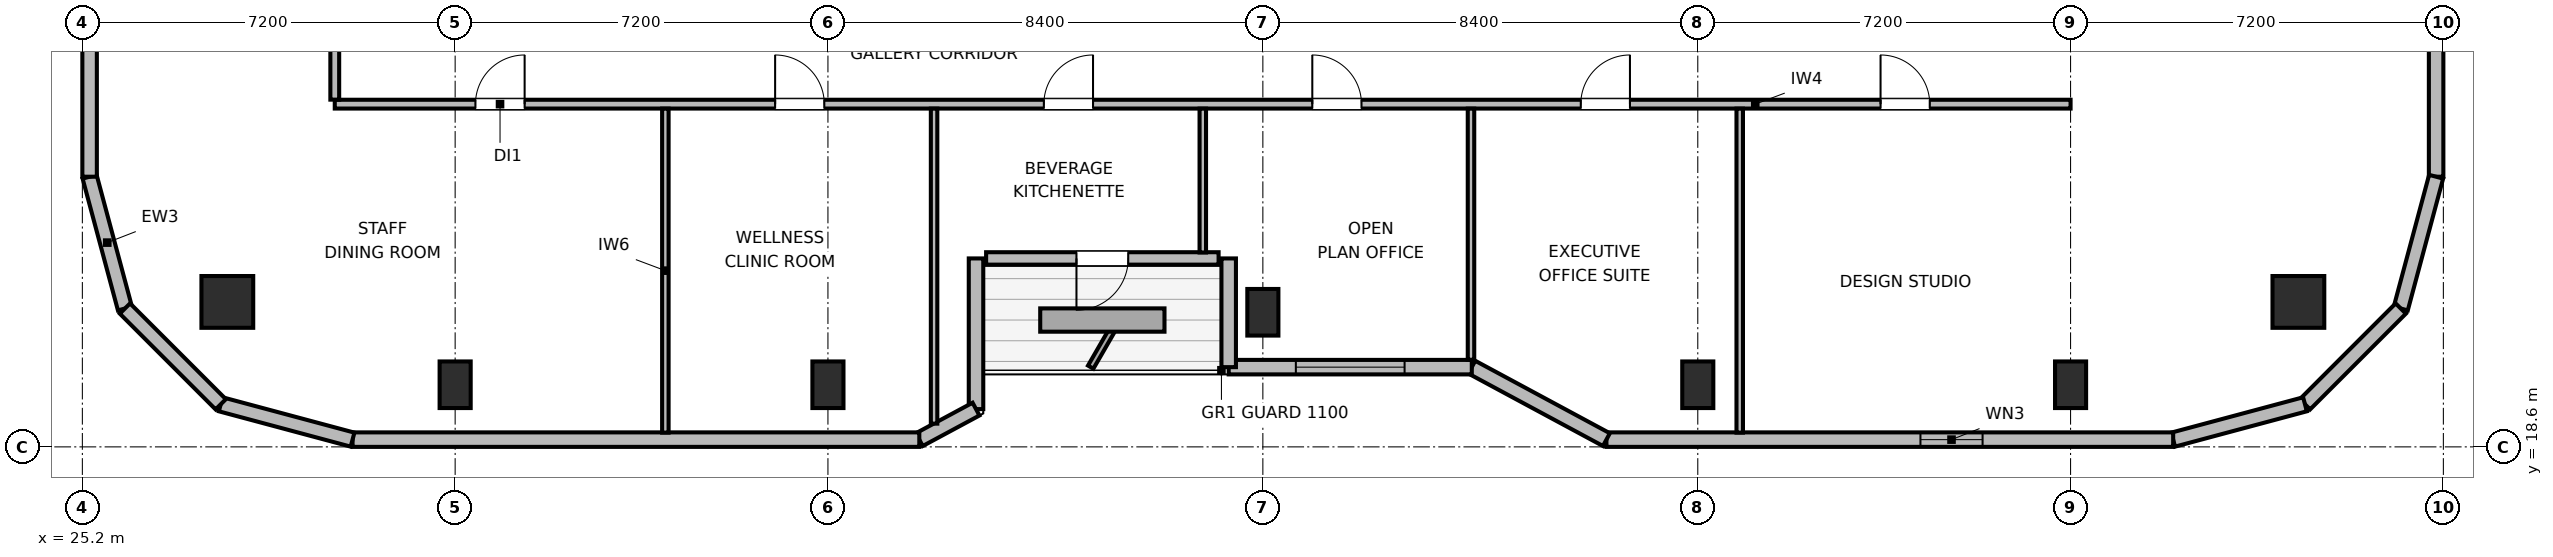
"""IFC4 building model, lengths in metres.
Left out: names, types, materials, properties, quantities, classifications, styles, units other than length and angle.
Written with IfcOpenShell. Run it as: python <this file> out.ifc"""

import sys

from ifc_helpers import new_model, si_unit, direction, frame, frame_2d, origin, origin_2d, place, context, subcontext, project, spatial, rectangle, circle, extrude, element, fill, save


model = new_model("IFC4")
c1 = context("Model", 3, precision=1e-05, world=origin(), true_north=direction((0.0, 1.0)))
c2 = subcontext(c1, "Body", "Model", "MODEL_VIEW")
j1 = project(units=[si_unit("LENGTHUNIT", "METRE"), si_unit("PLANEANGLEUNIT", "RADIAN")], contexts=[c1])
p1 = place(None, origin())
s1 = spatial("IfcSite", under=j1, at=p1, CompositionType="ELEMENT")
p2 = place(p1, origin())
s2 = spatial("IfcBuilding", under=s1, at=p2, CompositionType="ELEMENT")
p3 = place(p2, frame((0.0, 0.0, 251.1)))
s3 = spatial("IfcBuildingStorey", under=s2, at=p3, CompositionType="ELEMENT", Elevation=251.1)
for number, where, z_axis, x_axis in (
    (1, (28.0, 21.4, 0.0), (0.0, 0.0, 1.0), (1.0, 0.0, 0.0)),
    (2, (68.0, 21.4, 0.0), (0.0, 0.0, 1.0), (1.0, 0.0, 0.0)),
):
    element("IfcColumn", number, at=place(p3, frame(where, z_axis=z_axis, x_axis=x_axis)), inside=s3, PredefinedType="COLUMN", context=c2, shape_type="SweptSolid", body=[
        extrude(circle(Radius=0.5, at=origin_2d()), origin(), (0.0, 0.0, 1.0), 3.9),
    ])
for number, where, z_axis, x_axis in (
    (3, (32.4, 19.8, 0.0), (0.0, 0.0, 1.0), (1.0, 0.0, 0.0)),
    (4, (39.6, 19.8, 0.0), (0.0, 0.0, 1.0), (1.0, 0.0, 0.0)),
    (5, (48.0, 21.2, 0.0), (0.0, 0.0, 1.0), (1.0, 0.0, 0.0)),
    (6, (56.4, 19.8, 0.0), (0.0, 0.0, 1.0), (1.0, 0.0, 0.0)),
    (7, (63.6, 19.8, 0.0), (0.0, 0.0, 1.0), (1.0, 0.0, 0.0)),
):
    element("IfcColumn", number, at=place(p3, frame(where, z_axis=z_axis, x_axis=x_axis)), inside=s3, PredefinedType="COLUMN", context=c2, shape_type="SweptSolid", body=[
        extrude(rectangle(XDim=0.6, YDim=0.9, at=origin_2d()), origin(), (0.0, 0.0, 1.0), 3.9),
    ])
p4 = place(p3, frame((26.022, 21.272, 0.0), z_axis=(0.0, 0.0, 1.0), x_axis=(-0.2588904131, 0.965906700466, 0.0)))
e8 = element("IfcWall", 8, at=p4, inside=s3, PredefinedType="SOLIDWALL", context=c2, shape_type="SweptSolid", body=[
    extrude(rectangle(XDim=2.636, YDim=0.28, at=frame_2d((1.318, 0.0))), origin(), (0.0, 0.0, 1.0), 3.68),
])
p5 = place(p3, frame((25.34, 23.818, 0.0), z_axis=(0.0, 0.0, 1.0), x_axis=(0.0, 1.0, 0.0)))
e9 = element("IfcWall", 9, at=p5, inside=s3, PredefinedType="SOLIDWALL", context=c2, shape_type="SweptSolid", body=[
    extrude(rectangle(XDim=5.442, YDim=0.28, at=frame_2d((2.721, 0.0))), origin(), (0.0, 0.0, 1.0), 3.68),
])
p6 = place(p3, frame((70.66, 37.66, 0.0), z_axis=(0.0, 0.0, 1.0), x_axis=(0.0, -1.0, 0.0)))
e10 = element("IfcWall", 10, at=p6, inside=s3, PredefinedType="SOLIDWALL", context=c2, shape_type="SweptSolid", body=[
    extrude(rectangle(XDim=13.842, YDim=0.28, at=frame_2d((6.921, 0.0))), origin(), (0.0, 0.0, 1.0), 3.68),
])
p7 = place(p6, frame((5.871, 0.0, 0.85)))
e11 = element("IfcOpeningElement", 11, at=p7, cuts=e10, PredefinedType="OPENING", context=c2, shape_type="SweptSolid", body=[
    extrude(rectangle(XDim=2.1, YDim=1.05, at=frame_2d((1.05, 0.525))), frame((0.0, 0.15, 0.0), z_axis=(0.0, -1.0, 0.0), x_axis=(1.0, 0.0, 0.0)), (0.0, 0.0, 1.0), 0.3),
])
p8 = place(p3, frame((70.66, 23.818, 0.0), z_axis=(0.0, 0.0, 1.0), x_axis=(-0.2588904131, -0.965906700466, 0.0)))
e12 = element("IfcWall", 12, at=p8, inside=s3, PredefinedType="SOLIDWALL", context=c2, shape_type="SweptSolid", body=[
    extrude(rectangle(XDim=2.636, YDim=0.28, at=frame_2d((1.318, 0.0))), origin(), (0.0, 0.0, 1.0), 3.68),
])
p9 = place(p3, frame((69.978, 21.272, 0.0), z_axis=(0.0, 0.0, 1.0), x_axis=(-0.707153437963, -0.707060121331, 0.0)))
e13 = element("IfcWall", 13, at=p9, inside=s3, PredefinedType="SOLIDWALL", context=c2, shape_type="SweptSolid", body=[
    extrude(rectangle(XDim=2.616, YDim=0.28, at=frame_2d((1.308, 0.0))), origin(), (0.0, 0.0, 1.0), 3.68),
])
p10 = place(p3, frame((68.127, 19.423, 0.0), z_axis=(0.0, 0.0, 1.0), x_axis=(-0.965883534663, -0.258976828051, 0.0)))
e14 = element("IfcWall", 14, at=p10, inside=s3, PredefinedType="SOLIDWALL", context=c2, shape_type="SweptSolid", body=[
    extrude(rectangle(XDim=2.636, YDim=0.28, at=frame_2d((1.318, 0.0))), origin(), (0.0, 0.0, 1.0), 3.68),
])
p11 = place(p3, frame((65.582, 18.74, 0.0), z_axis=(0.0, 0.0, 1.0), x_axis=(-1.0, 0.0, 0.0)))
e15 = element("IfcWall", 15, at=p11, inside=s3, PredefinedType="SOLIDWALL", context=c2, shape_type="SweptSolid", body=[
    extrude(rectangle(XDim=10.946, YDim=0.28, at=frame_2d((5.473, 0.0))), origin(), (0.0, 0.0, 1.0), 3.68),
])
p12 = place(p11, frame((3.681, 0.0, 0.85)))
e16 = element("IfcOpeningElement", 16, at=p12, cuts=e15, PredefinedType="OPENING", context=c2, shape_type="SweptSolid", body=[
    extrude(rectangle(XDim=1.2, YDim=1.1, at=frame_2d((0.6, 0.55))), frame((0.0, 0.15, 0.0), z_axis=(0.0, -1.0, 0.0), x_axis=(1.0, 0.0, 0.0)), (0.0, 0.0, 1.0), 0.3),
])
p13 = place(p3, frame((54.635, 18.74, 0.0), z_axis=(0.0, 0.0, 1.0), x_axis=(-0.880473754814, 0.474094892488, 0.0)))
e17 = element("IfcWall", 17, at=p13, inside=s3, PredefinedType="SOLIDWALL", context=c2, shape_type="SweptSolid", body=[
    extrude(rectangle(XDim=2.953, YDim=0.28, at=frame_2d((1.477, 0.0))), origin(), (0.0, 0.0, 1.0), 2.215),
])
p14 = place(p3, frame((52.035, 20.14, 0.0), z_axis=(0.0, 0.0, 1.0), x_axis=(-1.0, 0.0, 0.0)))
e18 = element("IfcWall", 18, at=p14, inside=s3, PredefinedType="SOLIDWALL", context=c2, shape_type="SweptSolid", body=[
    extrude(rectangle(XDim=4.695, YDim=0.28, at=frame_2d((2.348, 0.0))), origin(), (0.0, 0.0, 1.0), 2.215),
])
p15 = place(p14, frame((1.298, 0.0, 0.85)))
e19 = element("IfcOpeningElement", 19, at=p15, cuts=e18, PredefinedType="OPENING", context=c2, shape_type="SweptSolid", body=[
    extrude(rectangle(XDim=2.1, YDim=1.05, at=frame_2d((1.05, 0.525))), frame((0.0, 0.15, 0.0), z_axis=(0.0, -1.0, 0.0), x_axis=(1.0, 0.0, 0.0)), (0.0, 0.0, 1.0), 0.3),
])
p16 = place(p3, frame((47.34, 20.14, 0.0), z_axis=(0.0, 0.0, 1.0), x_axis=(0.0, 1.0, 0.0)))
e20 = element("IfcWall", 20, at=p16, inside=s3, PredefinedType="SOLIDWALL", context=c2, shape_type="SweptSolid", body=[
    extrude(rectangle(XDim=2.1, YDim=0.28, at=frame_2d((1.05, 0.0))), origin(), (0.0, 0.0, 1.0), 2.215),
])
p17 = place(p3, frame((47.145, 22.24, 0.0), z_axis=(0.0, 0.0, 1.0), x_axis=(-1.0, 0.0, 0.0)))
e21 = element("IfcWall", 21, at=p17, inside=s3, PredefinedType="SOLIDWALL", context=c2, shape_type="SweptSolid", body=[
    extrude(rectangle(XDim=4.49, YDim=0.24, at=frame_2d((2.245, 0.0))), origin(), (0.0, 0.0, 1.0), 2.215),
])
p18 = place(p17, frame((1.745, 0.0, 0.0)))
e22 = element("IfcOpeningElement", 22, at=p18, cuts=e21, PredefinedType="OPENING", context=c2, shape_type="SweptSolid", body=[
    extrude(rectangle(XDim=1.0, YDim=2.02, at=frame_2d((0.5, 1.01))), frame((0.0, 0.13, 0.0), z_axis=(0.0, -1.0, 0.0), x_axis=(1.0, 0.0, 0.0)), (0.0, 0.0, 1.0), 0.26),
])
p19 = place(p3, frame((42.46, 22.24, 0.0), z_axis=(0.0, 0.0, 1.0), x_axis=(0.0, -1.0, 0.0)))
e23 = element("IfcWall", 23, at=p19, inside=s3, PredefinedType="SOLIDWALL", context=c2, shape_type="SweptSolid", body=[
    extrude(rectangle(XDim=2.91, YDim=0.28, at=frame_2d((1.455, 0.0))), origin(), (0.0, 0.0, 1.0), 2.215),
])
p20 = place(p3, frame((42.46, 19.33, 0.0), z_axis=(0.0, 0.0, 1.0), x_axis=(-0.880515214249, -0.474017887296, 0.0)))
e24 = element("IfcWall", 24, at=p20, inside=s3, PredefinedType="SOLIDWALL", context=c2, shape_type="SweptSolid", body=[
    extrude(rectangle(XDim=1.244, YDim=0.28, at=frame_2d((0.622, 0.0))), origin(), (0.0, 0.0, 1.0), 3.68),
])
p21 = place(p3, frame((41.365, 18.74, 0.0), z_axis=(0.0, 0.0, 1.0), x_axis=(-1.0, 0.0, 0.0)))
e25 = element("IfcWall", 25, at=p21, inside=s3, PredefinedType="SOLIDWALL", context=c2, shape_type="SweptSolid", body=[
    extrude(rectangle(XDim=10.946, YDim=0.28, at=frame_2d((5.473, 0.0))), origin(), (0.0, 0.0, 1.0), 3.68),
])
p22 = place(p3, frame((30.418, 18.74, 0.0), z_axis=(0.0, 0.0, 1.0), x_axis=(-0.965883534663, 0.258976828051, 0.0)))
e26 = element("IfcWall", 26, at=p22, inside=s3, PredefinedType="SOLIDWALL", context=c2, shape_type="SweptSolid", body=[
    extrude(rectangle(XDim=2.636, YDim=0.28, at=frame_2d((1.318, 0.0))), origin(), (0.0, 0.0, 1.0), 3.68),
])
p23 = place(p3, frame((27.873, 19.423, 0.0), z_axis=(0.0, 0.0, 1.0), x_axis=(-0.707153437963, 0.707060121331, 0.0)))
e27 = element("IfcWall", 27, at=p23, inside=s3, PredefinedType="SOLIDWALL", context=c2, shape_type="SweptSolid", body=[
    extrude(rectangle(XDim=2.616, YDim=0.28, at=frame_2d((1.308, 0.0))), origin(), (0.0, 0.0, 1.0), 3.68),
])
p24 = place(p3, frame((30.075, 25.22, 0.0), z_axis=(0.0, 0.0, 1.0), x_axis=(1.0, 0.0, 0.0)))
e28 = element("IfcWall", 28, at=p24, inside=s3, PredefinedType="PARTITIONING", context=c2, shape_type="SweptSolid", body=[
    extrude(rectangle(XDim=33.525, YDim=0.17, at=frame_2d((16.763, 0.0))), origin(), (0.0, 0.0, 1.0), 3.68),
])
p25 = place(p24, frame((2.717, 0.0, 0.0)))
e29 = element("IfcOpeningElement", 29, at=p25, cuts=e28, PredefinedType="OPENING", context=c2, shape_type="SweptSolid", body=[
    extrude(rectangle(XDim=0.95, YDim=2.04, at=frame_2d((0.475, 1.02))), frame((0.0, 0.095, 0.0), z_axis=(0.0, -1.0, 0.0), x_axis=(1.0, 0.0, 0.0)), (0.0, 0.0, 1.0), 0.19),
])
p26 = place(p24, frame((8.505, 0.0, 0.0)))
e30 = element("IfcOpeningElement", 30, at=p26, cuts=e28, PredefinedType="OPENING", context=c2, shape_type="SweptSolid", body=[
    extrude(rectangle(XDim=0.95, YDim=2.04, at=frame_2d((0.475, 1.02))), frame((0.0, 0.095, 0.0), z_axis=(0.0, -1.0, 0.0), x_axis=(1.0, 0.0, 0.0)), (0.0, 0.0, 1.0), 0.19),
])
p27 = place(p24, frame((13.695, 0.0, 0.0)))
e31 = element("IfcOpeningElement", 31, at=p27, cuts=e28, PredefinedType="OPENING", context=c2, shape_type="SweptSolid", body=[
    extrude(rectangle(XDim=0.95, YDim=2.04, at=frame_2d((0.475, 1.02))), frame((0.0, 0.095, 0.0), z_axis=(0.0, -1.0, 0.0), x_axis=(1.0, 0.0, 0.0)), (0.0, 0.0, 1.0), 0.19),
])
p28 = place(p24, frame((18.88, 0.0, 0.0)))
e32 = element("IfcOpeningElement", 32, at=p28, cuts=e28, PredefinedType="OPENING", context=c2, shape_type="SweptSolid", body=[
    extrude(rectangle(XDim=0.95, YDim=2.04, at=frame_2d((0.475, 1.02))), frame((0.0, 0.095, 0.0), z_axis=(0.0, -1.0, 0.0), x_axis=(1.0, 0.0, 0.0)), (0.0, 0.0, 1.0), 0.19),
])
p29 = place(p24, frame((24.065, 0.0, 0.0)))
e33 = element("IfcOpeningElement", 33, at=p29, cuts=e28, PredefinedType="OPENING", context=c2, shape_type="SweptSolid", body=[
    extrude(rectangle(XDim=0.95, YDim=2.04, at=frame_2d((0.475, 1.02))), frame((0.0, 0.095, 0.0), z_axis=(0.0, -1.0, 0.0), x_axis=(1.0, 0.0, 0.0)), (0.0, 0.0, 1.0), 0.19),
])
p30 = place(p24, frame((29.855, 0.0, 0.0)))
e34 = element("IfcOpeningElement", 34, at=p30, cuts=e28, PredefinedType="OPENING", context=c2, shape_type="SweptSolid", body=[
    extrude(rectangle(XDim=0.95, YDim=2.04, at=frame_2d((0.475, 1.02))), frame((0.0, 0.095, 0.0), z_axis=(0.0, -1.0, 0.0), x_axis=(1.0, 0.0, 0.0)), (0.0, 0.0, 1.0), 0.19),
])
p31 = place(p3, frame((30.075, 25.307, 0.0), z_axis=(0.0, 0.0, 1.0), x_axis=(0.0, 1.0, 0.0)))
e35 = element("IfcWall", 35, at=p31, inside=s3, PredefinedType="PARTITIONING", context=c2, shape_type="SweptSolid", body=[
    extrude(rectangle(XDim=21.386, YDim=0.17, at=frame_2d((10.693, 0.0))), origin(), (0.0, 0.0, 1.0), 3.68),
])
p32 = place(p31, frame((4.428, 0.0, 0.0)))
e36 = element("IfcOpeningElement", 36, at=p32, cuts=e35, PredefinedType="OPENING", context=c2, shape_type="SweptSolid", body=[
    extrude(rectangle(XDim=0.95, YDim=2.04, at=frame_2d((0.475, 1.02))), frame((0.0, 0.095, 0.0), z_axis=(0.0, -1.0, 0.0), x_axis=(1.0, 0.0, 0.0)), (0.0, 0.0, 1.0), 0.19),
])
p33 = place(p31, frame((15.208, 0.0, 0.0)))
e37 = element("IfcOpeningElement", 37, at=p33, cuts=e35, PredefinedType="OPENING", context=c2, shape_type="SweptSolid", body=[
    extrude(rectangle(XDim=0.95, YDim=2.04, at=frame_2d((0.475, 1.02))), frame((0.0, 0.095, 0.0), z_axis=(0.0, -1.0, 0.0), x_axis=(1.0, 0.0, 0.0)), (0.0, 0.0, 1.0), 0.19),
])
p34 = place(p3, frame((36.46, 18.875, 0.0), z_axis=(0.0, 0.0, 1.0), x_axis=(0.0, 1.0, 0.0)))
e38 = element("IfcWall", 38, at=p34, inside=s3, PredefinedType="PARTITIONING", context=c2, shape_type="SweptSolid", body=[
    extrude(rectangle(XDim=6.258, YDim=0.125, at=frame_2d((3.129, 0.0))), origin(), (0.0, 0.0, 1.0), 3.68),
])
p35 = place(p3, frame((41.65, 19.049, 0.0), z_axis=(0.0, 0.0, 1.0), x_axis=(0.0, 1.0, 0.0)))
e39 = element("IfcWall", 39, at=p35, inside=s3, PredefinedType="PARTITIONING", context=c2, shape_type="SweptSolid", body=[
    extrude(rectangle(XDim=6.084, YDim=0.125, at=frame_2d((3.042, 0.0))), origin(), (0.0, 0.0, 1.0), 3.043),
])
p36 = place(p3, frame((46.84, 22.355, 0.0), z_axis=(0.0, 0.0, 1.0), x_axis=(0.0, 1.0, 0.0)))
e40 = element("IfcWall", 40, at=p36, inside=s3, PredefinedType="PARTITIONING", context=c2, shape_type="SweptSolid", body=[
    extrude(rectangle(XDim=2.778, YDim=0.125, at=frame_2d((1.389, 0.0))), origin(), (0.0, 0.0, 1.0), 3.68),
])
p37 = place(p3, frame((52.02, 20.283, 0.0), z_axis=(0.0, 0.0, 1.0), x_axis=(0.0, 1.0, 0.0)))
e41 = element("IfcWall", 41, at=p37, inside=s3, PredefinedType="PARTITIONING", context=c2, shape_type="SweptSolid", body=[
    extrude(rectangle(XDim=4.85, YDim=0.125, at=frame_2d((2.425, 0.0))), origin(), (0.0, 0.0, 1.0), 3.68),
])
p38 = place(p3, frame((57.21, 18.875, 0.0), z_axis=(0.0, 0.0, 1.0), x_axis=(0.0, 1.0, 0.0)))
e42 = element("IfcWall", 42, at=p38, inside=s3, PredefinedType="PARTITIONING", context=c2, shape_type="SweptSolid", body=[
    extrude(rectangle(XDim=6.258, YDim=0.125, at=frame_2d((3.129, 0.0))), origin(), (0.0, 0.0, 1.0), 3.68),
])
p39 = place(p12, origin())
e43 = element("IfcWindow", 43, at=p39, inside=s3, PartitioningType="SINGLE_PANEL", PredefinedType="WINDOW", context=c2, shape_type="SweptSolid", body=[
    extrude(rectangle(XDim=1.2, YDim=1.1, at=frame_2d((0.6, 0.55))), frame((0.0, 0.03, 0.0), z_axis=(0.0, -1.0, 0.0), x_axis=(1.0, 0.0, 0.0)), (0.0, 0.0, 1.0), 0.06),
])
fill(e16, e43)
p40 = place(p15, origin())
e44 = element("IfcWindow", 44, at=p40, inside=s3, PartitioningType="SINGLE_PANEL", PredefinedType="WINDOW", context=c2, shape_type="SweptSolid", body=[
    extrude(rectangle(XDim=2.1, YDim=1.05, at=frame_2d((1.05, 0.525))), frame((0.0, 0.03, 0.0), z_axis=(0.0, -1.0, 0.0), x_axis=(1.0, 0.0, 0.0)), (0.0, 0.0, 1.0), 0.06),
])
fill(e19, e44)
p41 = place(p18, origin())
e45 = element("IfcDoor", 45, at=p41, inside=s3, OperationType="SINGLE_SWING_RIGHT", PredefinedType="DOOR", context=c2, shape_type="SweptSolid", body=[
    extrude(rectangle(XDim=1.0, YDim=2.02, at=frame_2d((0.5, 1.01))), frame((0.0, 0.025, 0.0), z_axis=(0.0, -1.0, 0.0), x_axis=(1.0, 0.0, 0.0)), (0.0, 0.0, 1.0), 0.05),
])
fill(e22, e45)
p42 = place(p25, origin())
e46 = element("IfcDoor", 46, at=p42, inside=s3, OperationType="SINGLE_SWING_RIGHT", PredefinedType="DOOR", context=c2, shape_type="SweptSolid", body=[
    extrude(rectangle(XDim=0.95, YDim=2.04, at=frame_2d((0.475, 1.02))), frame((0.0, 0.025, 0.0), z_axis=(0.0, -1.0, 0.0), x_axis=(1.0, 0.0, 0.0)), (0.0, 0.0, 1.0), 0.05),
])
fill(e29, e46)
p43 = place(p26, origin())
e47 = element("IfcDoor", 47, at=p43, inside=s3, OperationType="SINGLE_SWING_LEFT", PredefinedType="DOOR", context=c2, shape_type="SweptSolid", body=[
    extrude(rectangle(XDim=0.95, YDim=2.04, at=frame_2d((0.475, 1.02))), frame((0.0, 0.025, 0.0), z_axis=(0.0, -1.0, 0.0), x_axis=(1.0, 0.0, 0.0)), (0.0, 0.0, 1.0), 0.05),
])
fill(e30, e47)
p44 = place(p27, origin())
e48 = element("IfcDoor", 48, at=p44, inside=s3, OperationType="SINGLE_SWING_RIGHT", PredefinedType="DOOR", context=c2, shape_type="SweptSolid", body=[
    extrude(rectangle(XDim=0.95, YDim=2.04, at=frame_2d((0.475, 1.02))), frame((0.0, 0.025, 0.0), z_axis=(0.0, -1.0, 0.0), x_axis=(1.0, 0.0, 0.0)), (0.0, 0.0, 1.0), 0.05),
])
fill(e31, e48)
p45 = place(p28, origin())
e49 = element("IfcDoor", 49, at=p45, inside=s3, OperationType="SINGLE_SWING_LEFT", PredefinedType="DOOR", context=c2, shape_type="SweptSolid", body=[
    extrude(rectangle(XDim=0.95, YDim=2.04, at=frame_2d((0.475, 1.02))), frame((0.0, 0.025, 0.0), z_axis=(0.0, -1.0, 0.0), x_axis=(1.0, 0.0, 0.0)), (0.0, 0.0, 1.0), 0.05),
])
fill(e32, e49)
p46 = place(p29, origin())
e50 = element("IfcDoor", 50, at=p46, inside=s3, OperationType="SINGLE_SWING_RIGHT", PredefinedType="DOOR", context=c2, shape_type="SweptSolid", body=[
    extrude(rectangle(XDim=0.95, YDim=2.04, at=frame_2d((0.475, 1.02))), frame((0.0, 0.025, 0.0), z_axis=(0.0, -1.0, 0.0), x_axis=(1.0, 0.0, 0.0)), (0.0, 0.0, 1.0), 0.05),
])
fill(e33, e50)
p47 = place(p30, origin())
e51 = element("IfcDoor", 51, at=p47, inside=s3, OperationType="SINGLE_SWING_LEFT", PredefinedType="DOOR", context=c2, shape_type="SweptSolid", body=[
    extrude(rectangle(XDim=0.95, YDim=2.04, at=frame_2d((0.475, 1.02))), frame((0.0, 0.025, 0.0), z_axis=(0.0, -1.0, 0.0), x_axis=(1.0, 0.0, 0.0)), (0.0, 0.0, 1.0), 0.05),
])
fill(e34, e51)
save(model, sys.argv[1])
